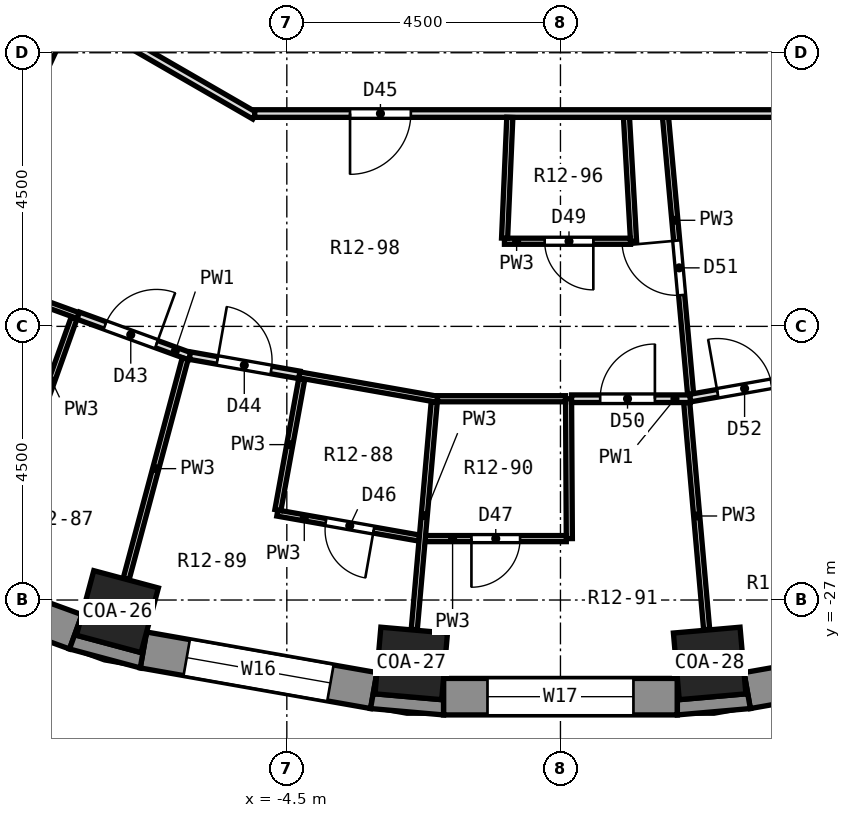
"""IFC4 building model, lengths in metres.
Left out: names, types, materials, properties, quantities, classifications, styles, units other than length and angle.
Written with IfcOpenShell. Run it as: python <this file> out.ifc"""

import sys

from ifc_helpers import new_model, si_unit, direction, frame, frame_2d, origin, origin_2d, place, context, subcontext, project, spatial, polyline, rectangle, outline, extrude, element, fill, save


model = new_model("IFC4")
c1 = context("Model", 3, precision=1e-05, world=origin(), true_north=direction((0.0, 1.0)))
c2 = subcontext(c1, "Body", "Model", "MODEL_VIEW")
j1 = project(units=[si_unit("LENGTHUNIT", "METRE"), si_unit("PLANEANGLEUNIT", "RADIAN")], contexts=[c1])
p1 = place(None, origin())
s1 = spatial("IfcSite", under=j1, at=p1, CompositionType="ELEMENT")
p2 = place(p1, origin())
s2 = spatial("IfcBuilding", under=s1, at=p2, CompositionType="ELEMENT")
p3 = place(p2, frame((0.0, 0.0, 56.0)))
s3 = spatial("IfcBuildingStorey", under=s2, at=p3, CompositionType="ELEMENT", Elevation=56.0)
for number, where, z_axis, x_axis in (
    (1, (-7.286, -27.191, 0.0), (0.0, 0.0, 1.0), (-0.259, -0.966, 0.0)),
    (2, (-2.453, -28.043, 0.0), (0.0, 0.0, 1.0), (-0.087, -0.996, 0.0)),
    (3, (2.453, -28.043, 0.0), (0.0, 0.0, 1.0), (0.087, -0.996, 0.0)),
):
    element("IfcColumn", number, at=place(p3, frame(where, z_axis=z_axis, x_axis=x_axis)), inside=s3, PredefinedType="COLUMN", context=c2, shape_type="SweptSolid", body=[
        extrude(rectangle(XDim=1.1, YDim=1.1, at=origin_2d()), origin(), (0.0, 0.0, 1.0), 3.3),
    ])
p4 = place(p3, frame((-11.585, -26.208, 0.0), z_axis=(0.0, 0.0, 1.0), x_axis=(0.939689588564, -0.342028474173, 0.0)))
e4 = element("IfcWall", 4, at=p4, inside=s3, PredefinedType="SOLIDWALL", context=c2, shape_type="SweptSolid", body=[
    extrude(rectangle(XDim=3.846, YDim=0.6, at=frame_2d((1.923, 0.0))), origin(), (0.0, 0.0, 1.0), 2.75),
])
p5 = place(p4, frame((0.723, 0.0, 0.9)))
e5 = element("IfcOpeningElement", 5, at=p5, cuts=e4, PredefinedType="OPENING", context=c2, shape_type="SweptSolid", body=[
    extrude(rectangle(XDim=2.4, YDim=1.8, at=frame_2d((1.2, 0.9))), frame((0.0, 0.312, 0.0), z_axis=(0.0, -1.0, 0.0), x_axis=(1.0, 0.0, 0.0)), (0.0, 0.0, 1.0), 0.624),
])
p6 = place(p3, frame((-6.858, -27.821, 0.0), z_axis=(0.0, 0.0, 1.0), x_axis=(0.984800809218, -0.173687553279, 0.0)))
e6 = element("IfcWall", 6, at=p6, inside=s3, PredefinedType="SOLIDWALL", context=c2, shape_type="SweptSolid", body=[
    extrude(rectangle(XDim=3.846, YDim=0.6, at=frame_2d((1.923, 0.0))), origin(), (0.0, 0.0, 1.0), 2.75),
])
p7 = place(p6, frame((0.723, 0.0, 0.9)))
e7 = element("IfcOpeningElement", 7, at=p7, cuts=e6, PredefinedType="OPENING", context=c2, shape_type="SweptSolid", body=[
    extrude(rectangle(XDim=2.4, YDim=1.8, at=frame_2d((1.2, 0.9))), frame((0.0, 0.312, 0.0), z_axis=(0.0, -1.0, 0.0), x_axis=(1.0, 0.0, 0.0)), (0.0, 0.0, 1.0), 0.624),
])
p8 = place(p3, frame((-1.923, -28.59, 0.0), z_axis=(0.0, 0.0, 1.0), x_axis=(1.0, 0.0, 0.0)))
e8 = element("IfcWall", 8, at=p8, inside=s3, PredefinedType="SOLIDWALL", context=c2, shape_type="SweptSolid", body=[
    extrude(rectangle(XDim=3.846, YDim=0.6, at=frame_2d((1.923, 0.0))), origin(), (0.0, 0.0, 1.0), 2.75),
])
p9 = place(p8, frame((0.723, 0.0, 0.9)))
e9 = element("IfcOpeningElement", 9, at=p9, cuts=e8, PredefinedType="OPENING", context=c2, shape_type="SweptSolid", body=[
    extrude(rectangle(XDim=2.4, YDim=1.8, at=frame_2d((1.2, 0.9))), frame((0.0, 0.312, 0.0), z_axis=(0.0, -1.0, 0.0), x_axis=(1.0, 0.0, 0.0)), (0.0, 0.0, 1.0), 0.624),
])
p10 = place(p3, frame((3.071, -28.489, 0.0), z_axis=(0.0, 0.0, 1.0), x_axis=(0.984800809218, 0.173687553279, 0.0)))
e10 = element("IfcWall", 10, at=p10, inside=s3, PredefinedType="SOLIDWALL", context=c2, shape_type="SweptSolid", body=[
    extrude(rectangle(XDim=3.846, YDim=0.6, at=frame_2d((1.923, 0.0))), origin(), (0.0, 0.0, 1.0), 2.75),
])
p11 = place(p10, frame((0.723, 0.0, 0.9)))
e11 = element("IfcOpeningElement", 11, at=p11, cuts=e10, PredefinedType="OPENING", context=c2, shape_type="SweptSolid", body=[
    extrude(rectangle(XDim=2.4, YDim=1.8, at=frame_2d((1.2, 0.9))), frame((0.0, 0.312, 0.0), z_axis=(0.0, -1.0, 0.0), x_axis=(1.0, 0.0, 0.0)), (0.0, 0.0, 1.0), 0.624),
])
p12 = place(p3, origin())
e12 = element("IfcWall", 12, at=p12, inside=s3, PredefinedType="SOLIDWALL", context=c2, shape_type="SweptSolid", body=[
    extrude(outline(polyline([(-6.91, -28.117), (-6.806, -27.526), (-6.897, -27.865), (-7.959, -27.58), (-7.869, -27.241), (-8.074, -27.805), (-6.91, -28.117)])), origin(), (0.0, 0.0, 1.0), 2.75),
])
p13 = place(p3, origin())
e13 = element("IfcWall", 13, at=p13, inside=s3, PredefinedType="SOLIDWALL", context=c2, shape_type="SweptSolid", body=[
    extrude(outline(polyline([(-3.123, -28.785), (-1.923, -28.89), (-1.923, -28.29), (-1.954, -28.639), (-3.049, -28.543), (-3.019, -28.194), (-3.123, -28.785)])), origin(), (0.0, 0.0, 1.0), 2.75),
])
p14 = place(p3, origin())
e14 = element("IfcWall", 14, at=p14, inside=s3, PredefinedType="SOLIDWALL", context=c2, shape_type="SweptSolid", body=[
    extrude(outline(polyline([(1.923, -28.89), (3.123, -28.785), (3.019, -28.194), (3.049, -28.543), (1.954, -28.639), (1.923, -28.29), (1.923, -28.89)])), origin(), (0.0, 0.0, 1.0), 2.75),
])
p15 = place(p3, frame((0.133, -23.69, 0.0), z_axis=(0.0, 0.0, 1.0), x_axis=(0.005625640731, -0.999984175958, 0.0)))
e15 = element("IfcWall", 15, at=p15, inside=s3, PredefinedType="PARTITIONING", context=c2, shape_type="SweptSolid", body=[
    extrude(rectangle(XDim=2.3, YDim=0.1, at=frame_2d((1.15, 0.0))), origin(), (0.0, 0.0, 1.0), 2.75),
])
p16 = place(p3, frame((1.085, -19.062, 0.0), z_axis=(0.0, 0.0, 1.0), x_axis=(0.057060010535, -0.998370750372, 0.0)))
e16 = element("IfcWall", 16, at=p16, inside=s3, PredefinedType="PARTITIONING", context=c2, shape_type="SweptSolid", body=[
    extrude(rectangle(XDim=2.041, YDim=0.1, at=frame_2d((1.021, 0.0))), origin(), (0.0, 0.0, 1.0), 2.75),
])
p17 = place(p3, frame((2.077, -23.752, 0.0), z_axis=(0.0, 0.0, 1.0), x_axis=(0.087439331166, -0.996169846645, 0.0)))
e17 = element("IfcWall", 17, at=p17, inside=s3, PredefinedType="PARTITIONING", context=c2, shape_type="SweptSolid", body=[
    extrude(rectangle(XDim=3.747, YDim=0.1, at=frame_2d((1.874, 0.0))), origin(), (0.0, 0.0, 1.0), 2.75),
])
p18 = place(p3, frame((1.728, -19.062, 0.0), z_axis=(0.0, 0.0, 1.0), x_axis=(0.090314228744, -0.995913319565, 0.0)))
e18 = element("IfcWall", 18, at=p18, inside=s3, PredefinedType="PARTITIONING", context=c2, shape_type="SweptSolid", body=[
    extrude(rectangle(XDim=4.571, YDim=0.1, at=frame_2d((2.286, 0.0))), origin(), (0.0, 0.0, 1.0), 2.75),
])
p19 = place(p18, frame((2.036, 0.0, 0.0)))
e19 = element("IfcOpeningElement", 19, at=p19, cuts=e18, PredefinedType="OPENING", context=c2, shape_type="SweptSolid", body=[
    extrude(rectangle(XDim=0.9, YDim=2.1, at=frame_2d((0.45, 1.05))), frame((0.0, 0.062, 0.0), z_axis=(0.0, -1.0, 0.0), x_axis=(1.0, 0.0, 0.0)), (0.0, 0.0, 1.0), 0.124),
])
p20 = place(p3, frame((-13.855, -13.94, 0.0), z_axis=(0.0, 0.0, 1.0), x_axis=(0.866024825845, -0.50000100102, 0.0)))
e20 = element("IfcWall", 20, at=p20, inside=s3, PredefinedType="PARTITIONING", context=c2, shape_type="SweptSolid", body=[
    extrude(rectangle(XDim=10.192, YDim=0.125, at=frame_2d((5.096, 0.0))), origin(), (0.0, 0.0, 1.0), 2.75),
])
p21 = place(p20, frame((1.704, 0.0, 0.0)))
e21 = element("IfcOpeningElement", 21, at=p21, cuts=e20, PredefinedType="OPENING", context=c2, shape_type="SweptSolid", body=[
    extrude(rectangle(XDim=0.9, YDim=2.1, at=frame_2d((0.45, 1.05))), frame((0.0, 0.074, 0.0), z_axis=(0.0, -1.0, 0.0), x_axis=(1.0, 0.0, 0.0)), (0.0, 0.0, 1.0), 0.149),
])
p22 = place(p3, frame((-9.979, -21.578, 0.0), z_axis=(0.0, 0.0, 1.0), x_axis=(0.939731280586, -0.341913907714, 0.0)))
e22 = element("IfcWall", 22, at=p22, inside=s3, PredefinedType="PARTITIONING", context=c2, shape_type="SweptSolid", body=[
    extrude(rectangle(XDim=2.18, YDim=0.1, at=frame_2d((1.09, 0.0))), origin(), (0.0, 0.0, 1.0), 2.75),
])
p23 = place(p3, frame((-7.931, -22.323, 0.0), z_axis=(0.0, 0.0, 1.0), x_axis=(0.9395852567, -0.342314979795, 0.0)))
e23 = element("IfcWall", 23, at=p23, inside=s3, PredefinedType="PARTITIONING", context=c2, shape_type="SweptSolid", body=[
    extrude(rectangle(XDim=1.953, YDim=0.125, at=frame_2d((0.977, 0.0))), origin(), (0.0, 0.0, 1.0), 2.75),
])
p24 = place(p23, frame((0.47, 0.0, 0.0)))
e24 = element("IfcOpeningElement", 24, at=p24, cuts=e23, PredefinedType="OPENING", context=c2, shape_type="SweptSolid", body=[
    extrude(rectangle(XDim=0.9, YDim=2.1, at=frame_2d((0.45, 1.05))), frame((0.0, 0.074, 0.0), z_axis=(0.0, -1.0, 0.0), x_axis=(1.0, 0.0, 0.0)), (0.0, 0.0, 1.0), 0.149),
])
p25 = place(p3, frame((-4.656, -25.57, 0.0), z_axis=(0.0, 0.0, 1.0), x_axis=(0.984821926169, -0.173567778511, 0.0)))
e25 = element("IfcWall", 25, at=p25, inside=s3, PredefinedType="PARTITIONING", context=c2, shape_type="SweptSolid", body=[
    extrude(rectangle(XDim=2.369, YDim=0.1, at=frame_2d((1.184, 0.0))), origin(), (0.0, 0.0, 1.0), 2.75),
])
p26 = place(p25, frame((0.809, 0.0, 0.0)))
e26 = element("IfcOpeningElement", 26, at=p26, cuts=e25, PredefinedType="OPENING", context=c2, shape_type="SweptSolid", body=[
    extrude(rectangle(XDim=0.8, YDim=2.1, at=frame_2d((0.4, 1.05))), frame((0.0, 0.062, 0.0), z_axis=(0.0, -1.0, 0.0), x_axis=(1.0, 0.0, 0.0)), (0.0, 0.0, 1.0), 0.124),
])
p27 = place(p3, frame((-4.293, -23.298, 0.0), z_axis=(0.0, 0.0, 1.0), x_axis=(0.984801677979, -0.173682627367, 0.0)))
e27 = element("IfcWall", 27, at=p27, inside=s3, PredefinedType="PARTITIONING", context=c2, shape_type="SweptSolid", body=[
    extrude(rectangle(XDim=2.305, YDim=0.1, at=frame_2d((1.153, 0.0))), origin(), (0.0, 0.0, 1.0), 2.75),
])
p28 = place(p3, frame((-6.094, -22.981, 0.0), z_axis=(0.0, 0.0, 1.0), x_axis=(0.984813123205, -0.173617719035, 0.0)))
e28 = element("IfcWall", 28, at=p28, inside=s3, PredefinedType="PARTITIONING", context=c2, shape_type="SweptSolid", body=[
    extrude(rectangle(XDim=1.828, YDim=0.125, at=frame_2d((0.914, 0.0))), origin(), (0.0, 0.0, 1.0), 2.75),
])
p29 = place(p28, frame((0.458, 0.0, 0.0)))
e29 = element("IfcOpeningElement", 29, at=p29, cuts=e28, PredefinedType="OPENING", context=c2, shape_type="SweptSolid", body=[
    extrude(rectangle(XDim=0.9, YDim=2.1, at=frame_2d((0.45, 1.05))), frame((0.0, 0.074, 0.0), z_axis=(0.0, -1.0, 0.0), x_axis=(1.0, 0.0, 0.0)), (0.0, 0.0, 1.0), 0.149),
])
p30 = place(p3, frame((-2.224, -25.99, 0.0), z_axis=(0.0, 0.0, 1.0), x_axis=(1.0, 0.0, 0.0)))
e30 = element("IfcWall", 30, at=p30, inside=s3, PredefinedType="PARTITIONING", context=c2, shape_type="SweptSolid", body=[
    extrude(rectangle(XDim=2.32, YDim=0.1, at=frame_2d((1.16, 0.0))), origin(), (0.0, 0.0, 1.0), 2.75),
])
p31 = place(p30, frame((0.76, 0.0, 0.0)))
e31 = element("IfcOpeningElement", 31, at=p31, cuts=e30, PredefinedType="OPENING", context=c2, shape_type="SweptSolid", body=[
    extrude(rectangle(XDim=0.8, YDim=2.1, at=frame_2d((0.4, 1.05))), frame((0.0, 0.062, 0.0), z_axis=(0.0, -1.0, 0.0), x_axis=(1.0, 0.0, 0.0)), (0.0, 0.0, 1.0), 0.124),
])
p32 = place(p3, frame((-2.023, -23.69, 0.0), z_axis=(0.0, 0.0, 1.0), x_axis=(1.0, 0.0, 0.0)))
e32 = element("IfcWall", 32, at=p32, inside=s3, PredefinedType="PARTITIONING", context=c2, shape_type="SweptSolid", body=[
    extrude(rectangle(XDim=2.106, YDim=0.1, at=frame_2d((1.053, 0.0))), origin(), (0.0, 0.0, 1.0), 2.75),
])
p33 = place(p3, frame((0.183, -23.69, 0.0), z_axis=(0.0, 0.0, 1.0), x_axis=(1.0, 0.0, 0.0)))
e33 = element("IfcWall", 33, at=p33, inside=s3, PredefinedType="PARTITIONING", context=c2, shape_type="SweptSolid", body=[
    extrude(rectangle(XDim=1.953, YDim=0.125, at=frame_2d((0.977, 0.0))), origin(), (0.0, 0.0, 1.0), 2.75),
])
p34 = place(p33, frame((0.47, 0.0, 0.0)))
e34 = element("IfcOpeningElement", 34, at=p34, cuts=e33, PredefinedType="OPENING", context=c2, shape_type="SweptSolid", body=[
    extrude(rectangle(XDim=0.9, YDim=2.1, at=frame_2d((0.45, 1.05))), frame((0.0, 0.074, 0.0), z_axis=(0.0, -1.0, 0.0), x_axis=(1.0, 0.0, 0.0)), (0.0, 0.0, 1.0), 0.149),
])
p35 = place(p3, frame((-0.921, -21.1, 0.0), z_axis=(0.0, 0.0, 1.0), x_axis=(1.0, 0.0, 0.0)))
e35 = element("IfcWall", 35, at=p35, inside=s3, PredefinedType="PARTITIONING", context=c2, shape_type="SweptSolid", body=[
    extrude(rectangle(XDim=2.073, YDim=0.1, at=frame_2d((1.037, 0.0))), origin(), (0.0, 0.0, 1.0), 2.75),
])
p36 = place(p35, frame((0.662, 0.0, 0.0)))
e36 = element("IfcOpeningElement", 36, at=p36, cuts=e35, PredefinedType="OPENING", context=c2, shape_type="SweptSolid", body=[
    extrude(rectangle(XDim=0.8, YDim=2.1, at=frame_2d((0.4, 1.05))), frame((0.0, 0.062, 0.0), z_axis=(0.0, -1.0, 0.0), x_axis=(1.0, 0.0, 0.0)), (0.0, 0.0, 1.0), 0.124),
])
p37 = place(p3, frame((-5.029, -19.0, 0.0), z_axis=(0.0, 0.0, 1.0), x_axis=(1.0, 0.0, 0.0)))
e37 = element("IfcWall", 37, at=p37, inside=s3, PredefinedType="PARTITIONING", context=c2, shape_type="SweptSolid", body=[
    extrude(rectangle(XDim=10.192, YDim=0.125, at=frame_2d((5.096, 0.0))), origin(), (0.0, 0.0, 1.0), 2.75),
])
p38 = place(p37, frame((1.568, 0.0, 0.0)))
e38 = element("IfcOpeningElement", 38, at=p38, cuts=e37, PredefinedType="OPENING", context=c2, shape_type="SweptSolid", body=[
    extrude(rectangle(XDim=1.0, YDim=2.1, at=frame_2d((0.5, 1.05))), frame((0.0, 0.074, 0.0), z_axis=(0.0, -1.0, 0.0), x_axis=(1.0, 0.0, 0.0)), (0.0, 0.0, 1.0), 0.149),
])
p39 = place(p3, frame((2.135, -23.679, 0.0), z_axis=(0.0, 0.0, 1.0), x_axis=(0.984774141248, 0.173838691691, 0.0)))
e39 = element("IfcWall", 39, at=p39, inside=s3, PredefinedType="PARTITIONING", context=c2, shape_type="SweptSolid", body=[
    extrude(rectangle(XDim=1.827, YDim=0.125, at=frame_2d((0.914, 0.0))), origin(), (0.0, 0.0, 1.0), 2.75),
])
p40 = place(p39, frame((0.457, 0.0, 0.0)))
e40 = element("IfcOpeningElement", 40, at=p40, cuts=e39, PredefinedType="OPENING", context=c2, shape_type="SweptSolid", body=[
    extrude(rectangle(XDim=0.9, YDim=2.1, at=frame_2d((0.45, 1.05))), frame((0.0, 0.074, 0.0), z_axis=(0.0, -1.0, 0.0), x_axis=(1.0, 0.0, 0.0)), (0.0, 0.0, 1.0), 0.149),
])
p41 = place(p3, frame((-11.664, -25.003, 0.0), z_axis=(0.0, 0.0, 1.0), x_axis=(0.423588806437, 0.905854581631, 0.0)))
e41 = element("IfcWall", 41, at=p41, inside=s3, PredefinedType="PARTITIONING", context=c2, shape_type="SweptSolid", body=[
    extrude(rectangle(XDim=8.455, YDim=0.15, at=frame_2d((4.227, 0.0))), origin(), (0.0, 0.0, 1.0), 2.75),
])
p42 = place(p3, frame((-8.735, -24.425, 0.0), z_axis=(0.0, 0.0, 1.0), x_axis=(0.336477788464, 0.941691402674, 0.0)))
e42 = element("IfcWall", 42, at=p42, inside=s3, PredefinedType="PARTITIONING", context=c2, shape_type="SweptSolid", body=[
    extrude(rectangle(XDim=2.188, YDim=0.1, at=frame_2d((1.094, 0.0))), origin(), (0.0, 0.0, 1.0), 2.75),
])
p43 = place(p3, frame((-7.141, -26.65, 0.0), z_axis=(0.0, 0.0, 1.0), x_axis=(0.258842464283, 0.965919550834, 0.0)))
e43 = element("IfcWall", 43, at=p43, inside=s3, PredefinedType="PARTITIONING", context=c2, shape_type="SweptSolid", body=[
    extrude(rectangle(XDim=3.747, YDim=0.1, at=frame_2d((1.874, 0.0))), origin(), (0.0, 0.0, 1.0), 2.75),
])
p44 = place(p3, frame((-4.647, -25.521, 0.0), z_axis=(0.0, 0.0, 1.0), x_axis=(0.179130970408, 0.983825236229, 0.0)))
e44 = element("IfcWall", 44, at=p44, inside=s3, PredefinedType="PARTITIONING", context=c2, shape_type="SweptSolid", body=[
    extrude(rectangle(XDim=2.188, YDim=0.1, at=frame_2d((1.094, 0.0))), origin(), (0.0, 0.0, 1.0), 2.75),
])
p45 = place(p3, frame((-2.404, -27.485, 0.0), z_axis=(0.0, 0.0, 1.0), x_axis=(0.087473063517, 0.996166885195, 0.0)))
e45 = element("IfcWall", 45, at=p45, inside=s3, PredefinedType="PARTITIONING", context=c2, shape_type="SweptSolid", body=[
    extrude(rectangle(XDim=3.76, YDim=0.1, at=frame_2d((1.88, 0.0))), origin(), (0.0, 0.0, 1.0), 2.75),
])
p46 = place(p3, frame((-0.919, -21.05, 0.0), z_axis=(0.0, 0.0, 1.0), x_axis=(0.043320061376, 0.999061245511, 0.0)))
e46 = element("IfcWall", 46, at=p46, inside=s3, PredefinedType="PARTITIONING", context=c2, shape_type="SweptSolid", body=[
    extrude(rectangle(XDim=1.99, YDim=0.1, at=frame_2d((0.995, 0.0))), origin(), (0.0, 0.0, 1.0), 2.75),
])
p47 = place(p7, origin())
e47 = element("IfcWindow", 47, at=p47, inside=s3, PartitioningType="SINGLE_PANEL", PredefinedType="WINDOW", context=c2, shape_type="SweptSolid", body=[
    extrude(rectangle(XDim=2.4, YDim=1.8, at=frame_2d((1.2, 0.9))), frame((0.0, 0.18, 0.0), z_axis=(0.0, -1.0, 0.0), x_axis=(1.0, 0.0, 0.0)), (0.0, 0.0, 1.0), 0.06),
])
fill(e7, e47)
p48 = place(p9, origin())
e48 = element("IfcWindow", 48, at=p48, inside=s3, PartitioningType="SINGLE_PANEL", PredefinedType="WINDOW", context=c2, shape_type="SweptSolid", body=[
    extrude(rectangle(XDim=2.4, YDim=1.8, at=frame_2d((1.2, 0.9))), frame((0.0, 0.18, 0.0), z_axis=(0.0, -1.0, 0.0), x_axis=(1.0, 0.0, 0.0)), (0.0, 0.0, 1.0), 0.06),
])
fill(e9, e48)
p49 = place(p24, origin())
e49 = element("IfcDoor", 49, at=p49, inside=s3, OperationType="SINGLE_SWING_RIGHT", PredefinedType="DOOR", context=c2, shape_type="SweptSolid", body=[
    extrude(rectangle(XDim=0.9, YDim=2.1, at=frame_2d((0.45, 1.05))), frame((0.0, 0.025, 0.0), z_axis=(0.0, -1.0, 0.0), x_axis=(1.0, 0.0, 0.0)), (0.0, 0.0, 1.0), 0.05),
])
fill(e24, e49)
p50 = place(p29, origin())
e50 = element("IfcDoor", 50, at=p50, inside=s3, OperationType="SINGLE_SWING_LEFT", PredefinedType="DOOR", context=c2, shape_type="SweptSolid", body=[
    extrude(rectangle(XDim=0.9, YDim=2.1, at=frame_2d((0.45, 1.05))), frame((0.0, 0.025, 0.0), z_axis=(0.0, -1.0, 0.0), x_axis=(1.0, 0.0, 0.0)), (0.0, 0.0, 1.0), 0.05),
])
fill(e29, e50)
p51 = place(p38, frame((1.0, 0.0, 0.0), z_axis=(0.0, 0.0, 1.0), x_axis=(-1.0, 0.0, 0.0)))
e51 = element("IfcDoor", 51, at=p51, inside=s3, OperationType="SINGLE_SWING_RIGHT", PredefinedType="DOOR", context=c2, shape_type="SweptSolid", body=[
    extrude(rectangle(XDim=1.0, YDim=2.1, at=frame_2d((0.5, 1.05))), frame((0.0, 0.025, 0.0), z_axis=(0.0, -1.0, 0.0), x_axis=(1.0, 0.0, 0.0)), (0.0, 0.0, 1.0), 0.05),
])
fill(e38, e51)
p52 = place(p26, frame((0.8, 0.0, 0.0), z_axis=(0.0, 0.0, 1.0), x_axis=(-1.0, 0.0, 0.0)))
e52 = element("IfcDoor", 52, at=p52, inside=s3, OperationType="SINGLE_SWING_LEFT", PredefinedType="DOOR", context=c2, shape_type="SweptSolid", body=[
    extrude(rectangle(XDim=0.8, YDim=2.1, at=frame_2d((0.4, 1.05))), frame((0.0, 0.025, 0.0), z_axis=(0.0, -1.0, 0.0), x_axis=(1.0, 0.0, 0.0)), (0.0, 0.0, 1.0), 0.05),
])
fill(e26, e52)
p53 = place(p31, frame((0.8, 0.0, 0.0), z_axis=(0.0, 0.0, 1.0), x_axis=(-1.0, 0.0, 0.0)))
e53 = element("IfcDoor", 53, at=p53, inside=s3, OperationType="SINGLE_SWING_RIGHT", PredefinedType="DOOR", context=c2, shape_type="SweptSolid", body=[
    extrude(rectangle(XDim=0.8, YDim=2.1, at=frame_2d((0.4, 1.05))), frame((0.0, 0.025, 0.0), z_axis=(0.0, -1.0, 0.0), x_axis=(1.0, 0.0, 0.0)), (0.0, 0.0, 1.0), 0.05),
])
fill(e31, e53)
p54 = place(p36, frame((0.8, 0.0, 0.0), z_axis=(0.0, 0.0, 1.0), x_axis=(-1.0, 0.0, 0.0)))
e54 = element("IfcDoor", 54, at=p54, inside=s3, OperationType="SINGLE_SWING_LEFT", PredefinedType="DOOR", context=c2, shape_type="SweptSolid", body=[
    extrude(rectangle(XDim=0.8, YDim=2.1, at=frame_2d((0.4, 1.05))), frame((0.0, 0.025, 0.0), z_axis=(0.0, -1.0, 0.0), x_axis=(1.0, 0.0, 0.0)), (0.0, 0.0, 1.0), 0.05),
])
fill(e36, e54)
p55 = place(p34, origin())
e55 = element("IfcDoor", 55, at=p55, inside=s3, OperationType="SINGLE_SWING_RIGHT", PredefinedType="DOOR", context=c2, shape_type="SweptSolid", body=[
    extrude(rectangle(XDim=0.9, YDim=2.1, at=frame_2d((0.45, 1.05))), frame((0.0, 0.025, 0.0), z_axis=(0.0, -1.0, 0.0), x_axis=(1.0, 0.0, 0.0)), (0.0, 0.0, 1.0), 0.05),
])
fill(e34, e55)
p56 = place(p19, frame((0.9, 0.0, 0.0), z_axis=(0.0, 0.0, 1.0), x_axis=(-1.0, 0.0, 0.0)))
e56 = element("IfcDoor", 56, at=p56, inside=s3, OperationType="SINGLE_SWING_RIGHT", PredefinedType="DOOR", context=c2, shape_type="SweptSolid", body=[
    extrude(rectangle(XDim=0.9, YDim=2.1, at=frame_2d((0.45, 1.05))), frame((0.0, 0.025, 0.0), z_axis=(0.0, -1.0, 0.0), x_axis=(1.0, 0.0, 0.0)), (0.0, 0.0, 1.0), 0.05),
])
fill(e19, e56)
p57 = place(p40, origin())
e57 = element("IfcDoor", 57, at=p57, inside=s3, OperationType="SINGLE_SWING_LEFT", PredefinedType="DOOR", context=c2, shape_type="SweptSolid", body=[
    extrude(rectangle(XDim=0.9, YDim=2.1, at=frame_2d((0.45, 1.05))), frame((0.0, 0.025, 0.0), z_axis=(0.0, -1.0, 0.0), x_axis=(1.0, 0.0, 0.0)), (0.0, 0.0, 1.0), 0.05),
])
fill(e40, e57)
save(model, sys.argv[1])
